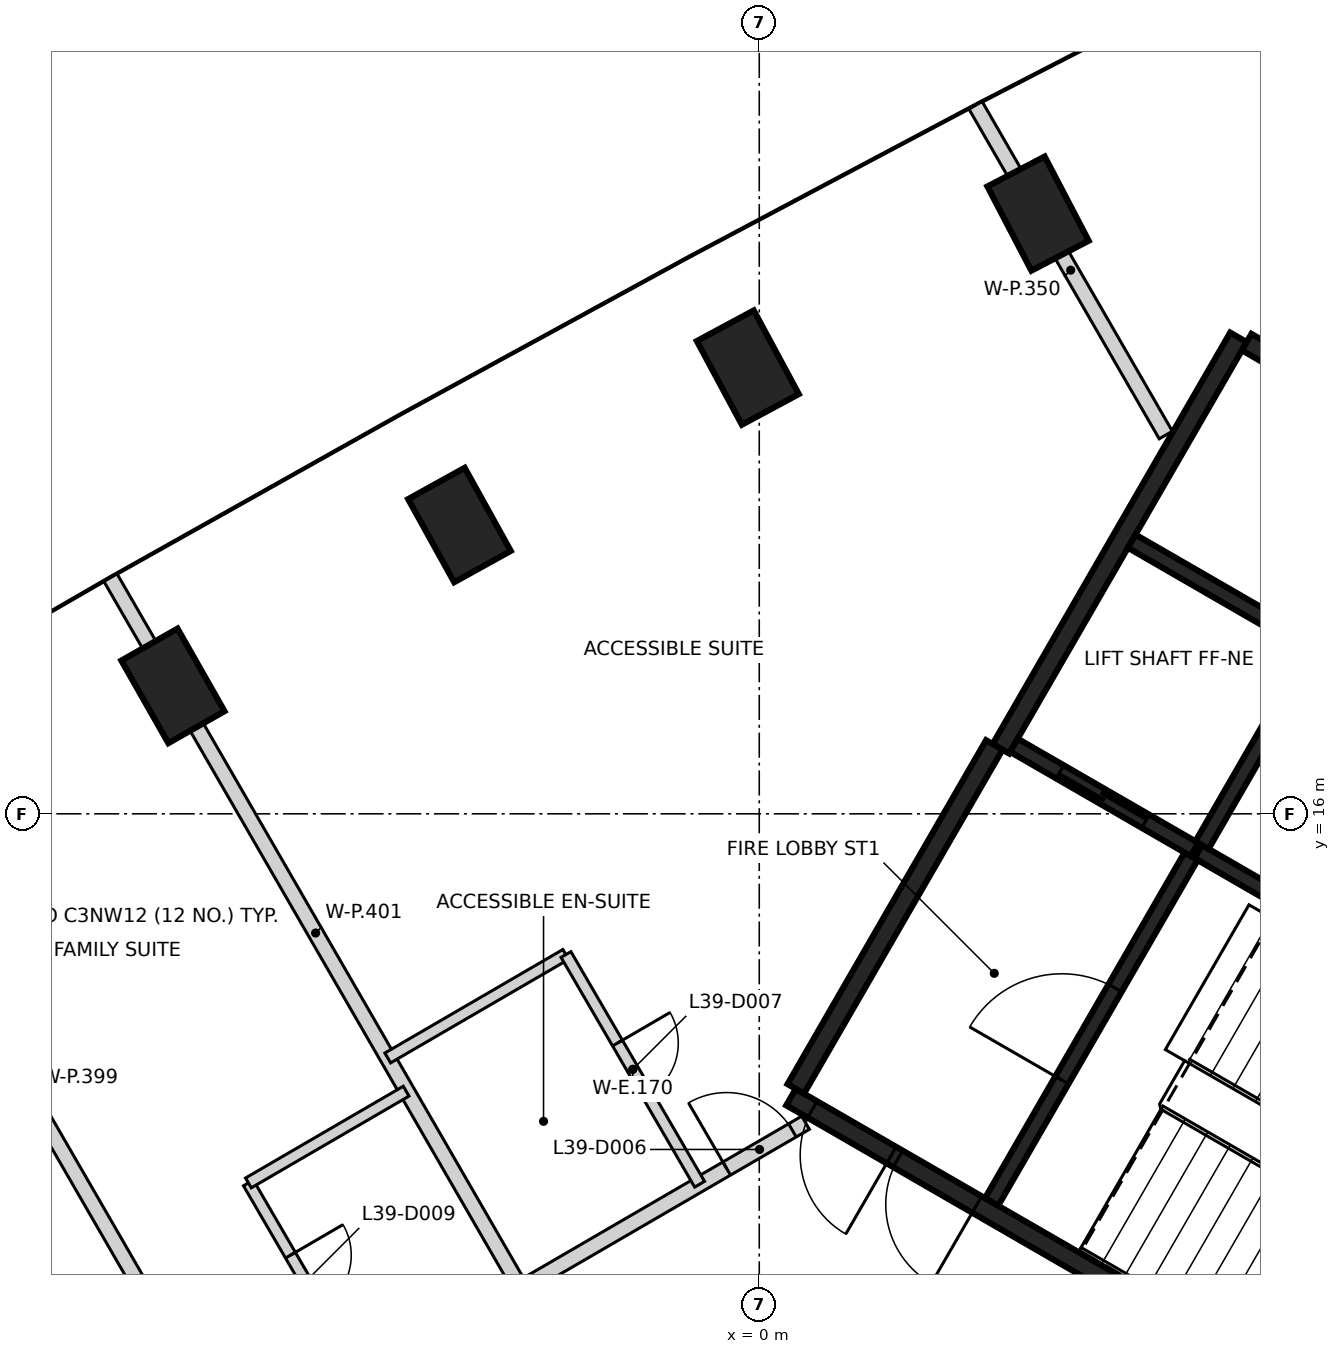
"""IFC4 building model, lengths in metres.
Left out: names, types, materials, properties, quantities, classifications, styles, units other than length and angle.
Written with IfcOpenShell. Run it as: python <this file> out.ifc"""

import sys

from ifc_helpers import new_model, si_unit, direction, frame, frame_2d, origin, origin_2d, place, context, subcontext, project, spatial, rectangle, extrude, element, fill, save


model = new_model("IFC4")
c1 = context("Model", 3, precision=1e-05, world=origin(), true_north=direction((0.0, 1.0)))
c2 = subcontext(c1, "Body", "Model", "MODEL_VIEW")
j1 = project(units=[si_unit("LENGTHUNIT", "METRE"), si_unit("PLANEANGLEUNIT", "RADIAN")], contexts=[c1])
p1 = place(None, origin())
s1 = spatial("IfcSite", under=j1, at=p1, CompositionType="ELEMENT")
p2 = place(p1, origin())
s2 = spatial("IfcBuilding", under=s1, at=p2, CompositionType="ELEMENT")
p3 = place(p2, frame((0.0, 0.0, 157.6)))
s3 = spatial("IfcBuildingStorey", under=s2, at=p3, CompositionType="ELEMENT", Elevation=157.6)
for number, where, z_axis, x_axis in (
    (1, (3.667, 23.896, -0.4), (0.0, 0.0, 1.0), (-0.463, 0.886, 0.0)),
    (2, (-0.151, 21.871, -0.4), (0.0, 0.0, 1.0), (-0.474, 0.881, 0.0)),
    (3, (-3.945, 19.8, -0.4), (0.0, 0.0, 1.0), (-0.485, 0.875, 0.0)),
    (4, (-7.714, 17.683, -0.4), (0.0, 0.0, 1.0), (-0.495, 0.869, 0.0)),
):
    element("IfcColumn", number, at=place(p3, frame(where, z_axis=z_axis, x_axis=x_axis)), inside=s3, PredefinedType="COLUMN", context=c2, shape_type="SweptSolid", body=[
        extrude(rectangle(XDim=1.25, YDim=0.85, at=origin_2d()), origin(), (0.0, 0.0, 1.0), 3.6),
    ])
p4 = place(p3, frame((10.42, 6.498, 0.0), z_axis=(0.0, 0.0, 1.0), x_axis=(-0.866021906294, 0.500006057782, 0.0)))
e5 = element("IfcWall", 5, at=p4, inside=s3, PredefinedType="SHEAR", context=c2, shape_type="SweptSolid", body=[
    extrude(rectangle(XDim=11.55, YDim=0.25, at=frame_2d((5.775, 0.0))), origin(), (0.0, 0.0, 1.0), 3.2),
])
p5 = place(p4, frame((10.025, 0.0, 0.0)))
e6 = element("IfcOpeningElement", 6, at=p5, cuts=e5, PredefinedType="OPENING", context=c2, shape_type="SweptSolid", body=[
    extrude(rectangle(XDim=1.2, YDim=2.1, at=frame_2d((0.6, 1.05))), frame((0.0, 0.135, 0.0), z_axis=(0.0, -1.0, 0.0), x_axis=(1.0, 0.0, 0.0)), (0.0, 0.0, 1.0), 0.27),
])
p6 = place(p4, frame((8.725, 0.0, 0.0)))
e7 = element("IfcOpeningElement", 7, at=p6, cuts=e5, PredefinedType="OPENING", context=c2, shape_type="SweptSolid", body=[
    extrude(rectangle(XDim=1.2, YDim=2.1, at=frame_2d((0.6, 1.05))), frame((0.0, 0.135, 0.0), z_axis=(0.0, -1.0, 0.0), x_axis=(1.0, 0.0, 0.0)), (0.0, 0.0, 1.0), 0.27),
])
p7 = place(p3, frame((3.179, 16.856, 0.0), z_axis=(0.0, 0.0, 1.0), x_axis=(0.500004234368, 0.866022959057, 0.0)))
e8 = element("IfcWall", 8, at=p7, inside=s3, PredefinedType="SHEAR", context=c2, shape_type="SweptSolid", body=[
    extrude(rectangle(XDim=6.25, YDim=0.25, at=frame_2d((3.125, 0.0))), origin(), (0.0, 0.0, 1.0), 3.2),
])
p8 = place(p3, frame((0.48, 12.381, 0.0), z_axis=(0.0, 0.0, 1.0), x_axis=(0.49999885962, 0.866026062182, 0.0)))
e9 = element("IfcWall", 9, at=p8, inside=s3, PredefinedType="SHEAR", context=c2, shape_type="SweptSolid", body=[
    extrude(rectangle(XDim=5.225, YDim=0.25, at=frame_2d((2.612, 0.0))), origin(), (0.0, 0.0, 1.0), 3.2),
])
p9 = place(p3, frame((6.413, 22.206, 0.0), z_axis=(0.0, 0.0, 1.0), x_axis=(0.866016279763, -0.500015802937, 0.0)))
e10 = element("IfcWall", 10, at=p9, inside=s3, PredefinedType="SHEAR", context=c2, shape_type="SweptSolid", body=[
    extrude(rectangle(XDim=1.849, YDim=0.25, at=frame_2d((0.925, 0.0))), origin(), (0.0, 0.0, 1.0), 3.2),
])
p10 = place(p3, frame((5.775, 15.502, 0.0), z_axis=(0.0, 0.0, 1.0), x_axis=(0.866020080793, -0.500009219579, 0.0)))
e11 = element("IfcWall", 11, at=p10, inside=s3, PredefinedType="SHEAR", context=c2, shape_type="SweptSolid", body=[
    extrude(rectangle(XDim=5.699, YDim=0.2, at=frame_2d((2.85, 0.0))), origin(), (0.0, 0.0, 1.0), 3.2),
])
p11 = place(p3, frame((3.057, 10.895, 0.0), z_axis=(0.0, 0.0, 1.0), x_axis=(0.499989418164, 0.866031513124, 0.0)))
e12 = element("IfcWall", 12, at=p11, inside=s3, PredefinedType="SHEAR", context=c2, shape_type="SweptSolid", body=[
    extrude(rectangle(XDim=5.251, YDim=0.2, at=frame_2d((2.625, 0.0))), origin(), (0.0, 0.0, 1.0), 3.2),
])
p12 = place(p11, frame((1.849, 0.0, 0.0)))
e13 = element("IfcOpeningElement", 13, at=p12, cuts=e12, PredefinedType="OPENING", context=c2, shape_type="SweptSolid", body=[
    extrude(rectangle(XDim=1.4, YDim=2.1, at=frame_2d((0.7, 1.05))), frame((0.0, 0.11, 0.0), z_axis=(0.0, -1.0, 0.0), x_axis=(1.0, 0.0, 0.0)), (0.0, 0.0, 1.0), 0.22),
])
p13 = place(p3, frame((7.199, 17.97, 0.0), z_axis=(0.0, 0.0, 1.0), x_axis=(-0.499968400327, -0.866043647095, 0.0)))
e14 = element("IfcWall", 14, at=p13, inside=s3, PredefinedType="SHEAR", context=c2, shape_type="SweptSolid", body=[
    extrude(rectangle(XDim=2.75, YDim=0.2, at=frame_2d((1.375, 0.0))), origin(), (0.0, 0.0, 1.0), 3.2),
])
p14 = place(p3, frame((5.725, 15.531, 0.0), z_axis=(0.0, 0.0, 1.0), x_axis=(-0.866037306777, 0.499979382845, 0.0)))
e15 = element("IfcWall", 15, at=p14, inside=s3, PredefinedType="SHEAR", context=c2, shape_type="SweptSolid", body=[
    extrude(rectangle(XDim=2.742, YDim=0.2, at=frame_2d((1.371, 0.0))), origin(), (0.0, 0.0, 1.0), 3.2),
])
p15 = place(p14, frame((0.743, 0.0, 0.0)))
e16 = element("IfcOpeningElement", 16, at=p15, cuts=e15, PredefinedType="OPENING", context=c2, shape_type="SweptSolid", body=[
    extrude(rectangle(XDim=1.3, YDim=2.1, at=frame_2d((0.65, 1.05))), frame((0.0, 0.11, 0.0), z_axis=(0.0, -1.0, 0.0), x_axis=(1.0, 0.0, 0.0)), (0.0, 0.0, 1.0), 0.22),
])
p16 = place(p3, frame((4.901, 19.586, 0.0), z_axis=(0.0, 0.0, 1.0), x_axis=(0.866022890907, -0.500004352405, 0.0)))
e17 = element("IfcWall", 17, at=p16, inside=s3, PredefinedType="SHEAR", context=c2, shape_type="SweptSolid", body=[
    extrude(rectangle(XDim=2.799, YDim=0.2, at=frame_2d((1.399, 0.0))), origin(), (0.0, 0.0, 1.0), 3.2),
])
p17 = place(p3, frame((-8.462, 6.664, 0.0), z_axis=(0.0, 0.0, 1.0), x_axis=(0.864575369233, 0.502503165081, 0.0)))
e18 = element("IfcWall", 18, at=p17, inside=s3, PredefinedType="PARTITIONING", context=c2, shape_type="SweptSolid", body=[
    extrude(rectangle(XDim=10.492, YDim=0.2, at=frame_2d((5.246, 0.0))), origin(), (0.0, 0.0, 1.0), 3.2),
])
p18 = place(p17, frame((9.292, 0.0, 0.0)))
e19 = element("IfcOpeningElement", 19, at=p18, cuts=e18, PredefinedType="OPENING", context=c2, shape_type="SweptSolid", body=[
    extrude(rectangle(XDim=1.0, YDim=2.1, at=frame_2d((0.5, 1.05))), frame((0.0, 0.11, 0.0), z_axis=(0.0, -1.0, 0.0), x_axis=(1.0, 0.0, 0.0)), (0.0, 0.0, 1.0), 0.22),
])
p19 = place(p17, frame((2.024, 0.0, 0.0)))
e20 = element("IfcOpeningElement", 20, at=p19, cuts=e18, PredefinedType="OPENING", context=c2, shape_type="SweptSolid", body=[
    extrude(rectangle(XDim=0.95, YDim=2.1, at=frame_2d((0.475, 1.05))), frame((0.0, 0.11, 0.0), z_axis=(0.0, -1.0, 0.0), x_axis=(1.0, 0.0, 0.0)), (0.0, 0.0, 1.0), 0.22),
])
p20 = place(p17, frame((0.698, 0.0, 0.0)))
e21 = element("IfcOpeningElement", 21, at=p20, cuts=e18, PredefinedType="OPENING", context=c2, shape_type="SweptSolid", body=[
    extrude(rectangle(XDim=0.95, YDim=2.1, at=frame_2d((0.475, 1.05))), frame((0.0, 0.11, 0.0), z_axis=(0.0, -1.0, 0.0), x_axis=(1.0, 0.0, 0.0)), (0.0, 0.0, 1.0), 0.22),
])
p21 = place(p3, frame((-12.279, 16.946, 0.0), z_axis=(0.0, 0.0, 1.0), x_axis=(0.500003997498, -0.866023095816, 0.0)))
e22 = element("IfcWall", 22, at=p21, inside=s3, PredefinedType="PARTITIONING", context=c2, shape_type="SweptSolid", body=[
    extrude(rectangle(XDim=10.809, YDim=0.2, at=frame_2d((5.405, 0.0))), origin(), (0.0, 0.0, 1.0), 3.2),
])
p22 = place(p3, frame((-8.535, 19.107, 0.0), z_axis=(0.0, 0.0, 1.0), x_axis=(0.499882324153, -0.866093333307, 0.0)))
e23 = element("IfcWall", 23, at=p22, inside=s3, PredefinedType="PARTITIONING", context=c2, shape_type="SweptSolid", body=[
    extrude(rectangle(XDim=10.796, YDim=0.2, at=frame_2d((5.398, 0.0))), origin(), (0.0, 0.0, 1.0), 3.2),
])
p23 = place(p3, frame((2.845, 25.321, 0.0), z_axis=(0.0, 0.0, 1.0), x_axis=(0.499751996305, -0.866168541445, 0.0)))
e24 = element("IfcWall", 24, at=p23, inside=s3, PredefinedType="PARTITIONING", context=c2, shape_type="SweptSolid", body=[
    extrude(rectangle(XDim=5.008, YDim=0.2, at=frame_2d((2.504, 0.0))), origin(), (0.0, 0.0, 1.0), 3.2),
])
p24 = place(p3, frame((-6.721, 11.144, 0.0), z_axis=(0.0, 0.0, 1.0), x_axis=(0.502742108773, -0.864436447673, 0.0)))
e25 = element("IfcWall", 25, at=p24, inside=s3, PredefinedType="PARTITIONING", context=c2, shape_type="SweptSolid", body=[
    extrude(rectangle(XDim=3.0, YDim=0.15, at=frame_2d((1.5, 0.0))), origin(), (0.0, 0.0, 1.0), 3.2),
])
p25 = place(p24, frame((1.1, 0.0, 0.0)))
e26 = element("IfcOpeningElement", 26, at=p25, cuts=e25, PredefinedType="OPENING", context=c2, shape_type="SweptSolid", body=[
    extrude(rectangle(XDim=0.8, YDim=2.1, at=frame_2d((0.4, 1.05))), frame((0.0, 0.085, 0.0), z_axis=(0.0, -1.0, 0.0), x_axis=(1.0, 0.0, 0.0)), (0.0, 0.0, 1.0), 0.17),
])
p26 = place(p3, frame((-6.721, 11.144, 0.0), z_axis=(0.0, 0.0, 1.0), x_axis=(0.864386917082, 0.502827264155, 0.0)))
e27 = element("IfcWall", 27, at=p26, inside=s3, PredefinedType="PARTITIONING", context=c2, shape_type="SweptSolid", body=[
    extrude(rectangle(XDim=2.4, YDim=0.15, at=frame_2d((1.2, 0.0))), origin(), (0.0, 0.0, 1.0), 3.2),
])
p27 = place(p3, frame((-4.888, 12.788, 0.0), z_axis=(0.0, 0.0, 1.0), x_axis=(0.864480777266, 0.502665878827, 0.0)))
e28 = element("IfcWall", 28, at=p27, inside=s3, PredefinedType="PARTITIONING", context=c2, shape_type="SweptSolid", body=[
    extrude(rectangle(XDim=2.709, YDim=0.15, at=frame_2d((1.354, 0.0))), origin(), (0.0, 0.0, 1.0), 3.2),
])
p28 = place(p3, frame((-2.543, 14.149, 0.0), z_axis=(0.0, 0.0, 1.0), x_axis=(0.502854686853, -0.864370964292, 0.0)))
e29 = element("IfcWall", 29, at=p28, inside=s3, PredefinedType="PARTITIONING", context=c2, shape_type="SweptSolid", body=[
    extrude(rectangle(XDim=3.496, YDim=0.15, at=frame_2d((1.748, 0.0))), origin(), (0.0, 0.0, 1.0), 3.2),
])
p29 = place(p28, frame((1.348, 0.0, 0.0)))
e30 = element("IfcOpeningElement", 30, at=p29, cuts=e29, PredefinedType="OPENING", context=c2, shape_type="SweptSolid", body=[
    extrude(rectangle(XDim=0.8, YDim=2.1, at=frame_2d((0.4, 1.05))), frame((0.0, 0.085, 0.0), z_axis=(0.0, -1.0, 0.0), x_axis=(1.0, 0.0, 0.0)), (0.0, 0.0, 1.0), 0.17),
])
p30 = place(p15, origin())
e31 = element("IfcDoor", 31, at=p30, inside=s3, OperationType="SLIDING_TO_LEFT", PredefinedType="DOOR", context=c2, shape_type="SweptSolid", body=[
    extrude(rectangle(XDim=1.3, YDim=2.1, at=frame_2d((0.65, 1.05))), frame((0.0, 0.025, 0.0), z_axis=(0.0, -1.0, 0.0), x_axis=(1.0, 0.0, 0.0)), (0.0, 0.0, 1.0), 0.05),
])
fill(e16, e31)
p31 = place(p5, origin())
e32 = element("IfcDoor", 32, at=p31, inside=s3, OperationType="SINGLE_SWING_LEFT", PredefinedType="DOOR", context=c2, shape_type="SweptSolid", body=[
    extrude(rectangle(XDim=1.2, YDim=2.1, at=frame_2d((0.6, 1.05))), frame((0.0, 0.025, 0.0), z_axis=(0.0, -1.0, 0.0), x_axis=(1.0, 0.0, 0.0)), (0.0, 0.0, 1.0), 0.05),
])
fill(e6, e32)
p32 = place(p6, origin())
e33 = element("IfcDoor", 33, at=p32, inside=s3, OperationType="SINGLE_SWING_RIGHT", PredefinedType="DOOR", context=c2, shape_type="SweptSolid", body=[
    extrude(rectangle(XDim=1.2, YDim=2.1, at=frame_2d((0.6, 1.05))), frame((0.0, 0.025, 0.0), z_axis=(0.0, -1.0, 0.0), x_axis=(1.0, 0.0, 0.0)), (0.0, 0.0, 1.0), 0.05),
])
fill(e7, e33)
p33 = place(p12, origin())
e34 = element("IfcDoor", 34, at=p33, inside=s3, OperationType="SINGLE_SWING_LEFT", PredefinedType="DOOR", context=c2, shape_type="SweptSolid", body=[
    extrude(rectangle(XDim=1.4, YDim=2.1, at=frame_2d((0.7, 1.05))), frame((0.0, 0.025, 0.0), z_axis=(0.0, -1.0, 0.0), x_axis=(1.0, 0.0, 0.0)), (0.0, 0.0, 1.0), 0.05),
])
fill(e13, e34)
p34 = place(p18, origin())
e35 = element("IfcDoor", 35, at=p34, inside=s3, OperationType="SINGLE_SWING_LEFT", PredefinedType="DOOR", context=c2, shape_type="SweptSolid", body=[
    extrude(rectangle(XDim=1.0, YDim=2.1, at=frame_2d((0.5, 1.05))), frame((0.0, 0.025, 0.0), z_axis=(0.0, -1.0, 0.0), x_axis=(1.0, 0.0, 0.0)), (0.0, 0.0, 1.0), 0.05),
])
fill(e19, e35)
p35 = place(p29, origin())
e36 = element("IfcDoor", 36, at=p35, inside=s3, OperationType="SINGLE_SWING_LEFT", PredefinedType="DOOR", context=c2, shape_type="SweptSolid", body=[
    extrude(rectangle(XDim=0.8, YDim=2.1, at=frame_2d((0.4, 1.05))), frame((0.0, 0.025, 0.0), z_axis=(0.0, -1.0, 0.0), x_axis=(1.0, 0.0, 0.0)), (0.0, 0.0, 1.0), 0.05),
])
fill(e30, e36)
p36 = place(p25, origin())
e37 = element("IfcDoor", 37, at=p36, inside=s3, OperationType="SINGLE_SWING_LEFT", PredefinedType="DOOR", context=c2, shape_type="SweptSolid", body=[
    extrude(rectangle(XDim=0.8, YDim=2.1, at=frame_2d((0.4, 1.05))), frame((0.0, 0.025, 0.0), z_axis=(0.0, -1.0, 0.0), x_axis=(1.0, 0.0, 0.0)), (0.0, 0.0, 1.0), 0.05),
])
fill(e26, e37)
save(model, sys.argv[1])
